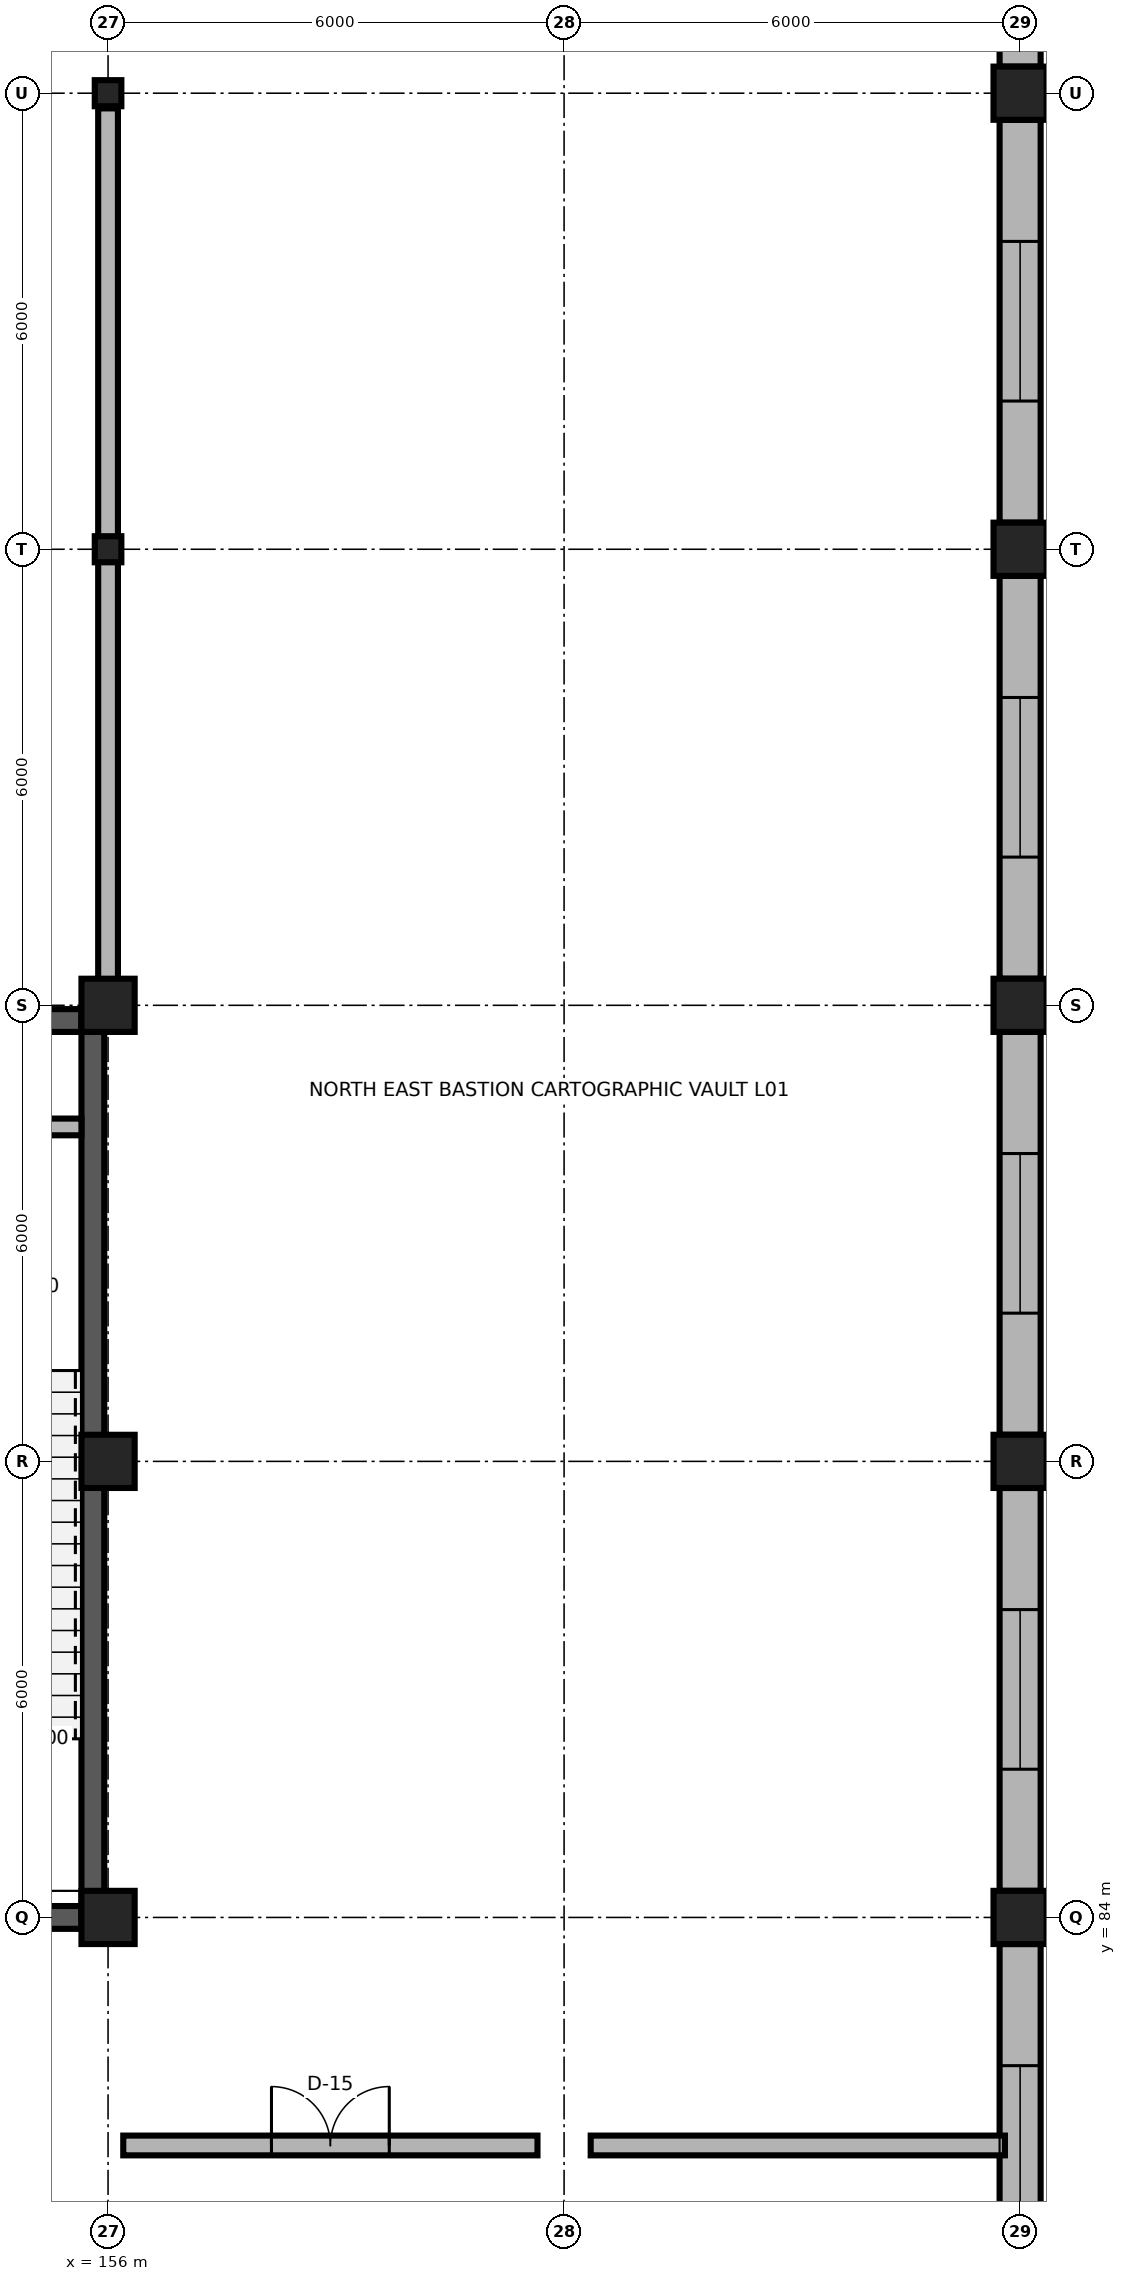
"""IFC4 building model, lengths in metres.
Left out: names, types, materials, properties, quantities, classifications, styles, units other than length and angle.
Written with IfcOpenShell. Run it as: python <this file> out.ifc"""

import sys

from ifc_helpers import new_model, si_unit, direction, frame, frame_2d, origin, origin_2d, place, context, subcontext, project, spatial, rectangle, i_section, extrude, element, fill, save


model = new_model("IFC4")
c1 = context("Model", 3, precision=1e-05, world=origin(), true_north=direction((0.0, 1.0)))
c2 = subcontext(c1, "Body", "Model", "MODEL_VIEW")
j1 = project(units=[si_unit("LENGTHUNIT", "METRE"), si_unit("PLANEANGLEUNIT", "RADIAN")], contexts=[c1])
p1 = place(None, origin())
s1 = spatial("IfcSite", under=j1, at=p1, CompositionType="ELEMENT")
p2 = place(p1, origin())
s2 = spatial("IfcBuilding", under=s1, at=p2, CompositionType="ELEMENT")
p3 = place(p2, origin())
s3 = spatial("IfcBuildingStorey", under=s2, at=p3, CompositionType="ELEMENT", Elevation=0.0)
for number, where, z_axis, x_axis in (
    (1, (156.0, 84.0, 0.0), (0.0, 0.0, 1.0), (1.0, 0.0, 0.0)),
    (2, (168.0, 84.0, 0.0), (0.0, 0.0, 1.0), (1.0, 0.0, 0.0)),
    (3, (156.0, 90.0, 0.0), (0.0, 0.0, 1.0), (1.0, 0.0, 0.0)),
    (4, (168.0, 90.0, 0.0), (0.0, 0.0, 1.0), (1.0, 0.0, 0.0)),
    (5, (156.0, 96.0, 0.0), (0.0, 0.0, 1.0), (1.0, 0.0, 0.0)),
    (6, (168.0, 96.0, 0.0), (0.0, 0.0, 1.0), (1.0, 0.0, 0.0)),
):
    element("IfcColumn", number, at=place(p3, frame(where, z_axis=z_axis, x_axis=x_axis)), inside=s3, PredefinedType="COLUMN", context=c2, shape_type="SweptSolid", body=[
        extrude(rectangle(XDim=0.7, YDim=0.7, at=origin_2d()), origin(), (0.0, 0.0, 1.0), 6.0),
    ])
p4 = place(p3, frame((156.0, 102.0, 0.0), z_axis=(0.0, 0.0, 1.0), x_axis=(1.0, 0.0, 0.0)))
e7 = element("IfcColumn", 7, at=p4, inside=s3, PredefinedType="COLUMN", context=c2, shape_type="SweptSolid", body=[
    extrude(i_section(OverallWidth=0.35, OverallDepth=0.343, WebThickness=0.01, FlangeThickness=0.015, FilletRadius=0.02, at=origin_2d()), origin(), (0.0, 0.0, 1.0), 6.0),
])
p5 = place(p3, frame((168.0, 102.0, 0.0), z_axis=(0.0, 0.0, 1.0), x_axis=(1.0, 0.0, 0.0)))
e8 = element("IfcColumn", 8, at=p5, inside=s3, PredefinedType="COLUMN", context=c2, shape_type="SweptSolid", body=[
    extrude(rectangle(XDim=0.7, YDim=0.7, at=origin_2d()), origin(), (0.0, 0.0, 1.0), 6.0),
])
p6 = place(p3, frame((156.0, 108.0, 0.0), z_axis=(0.0, 0.0, 1.0), x_axis=(1.0, 0.0, 0.0)))
e9 = element("IfcColumn", 9, at=p6, inside=s3, PredefinedType="COLUMN", context=c2, shape_type="SweptSolid", body=[
    extrude(i_section(OverallWidth=0.35, OverallDepth=0.343, WebThickness=0.01, FlangeThickness=0.015, FilletRadius=0.02, at=origin_2d()), origin(), (0.0, 0.0, 1.0), 6.0),
])
p7 = place(p3, frame((168.0, 108.0, 0.0), z_axis=(0.0, 0.0, 1.0), x_axis=(1.0, 0.0, 0.0)))
e10 = element("IfcColumn", 10, at=p7, inside=s3, PredefinedType="COLUMN", context=c2, shape_type="SweptSolid", body=[
    extrude(rectangle(XDim=0.7, YDim=0.7, at=origin_2d()), origin(), (0.0, 0.0, 1.0), 6.0),
])
p8 = place(p3, frame((168.0, 78.35, 0.0), z_axis=(0.0, 0.0, 1.0), x_axis=(0.0, 1.0, 0.0)))
e11 = element("IfcWall", 11, at=p8, inside=s3, PredefinedType="SOLIDWALL", context=c2, shape_type="SweptSolid", body=[
    extrude(rectangle(XDim=5.3, YDim=0.54, at=frame_2d((2.65, 0.0))), origin(), (0.0, 0.0, 1.0), 5.31),
])
p9 = place(p8, frame((1.6, 0.0, 0.85)))
e12 = element("IfcOpeningElement", 12, at=p9, cuts=e11, PredefinedType="OPENING", context=c2, shape_type="SweptSolid", body=[
    extrude(rectangle(XDim=2.1, YDim=3.4, at=frame_2d((1.05, 1.7))), frame((0.0, 0.285, 0.0), z_axis=(0.0, -1.0, 0.0), x_axis=(1.0, 0.0, 0.0)), (0.0, 0.0, 1.0), 0.57),
])
p10 = place(p3, frame((168.0, 84.35, 0.0), z_axis=(0.0, 0.0, 1.0), x_axis=(0.0, 1.0, 0.0)))
e13 = element("IfcWall", 13, at=p10, inside=s3, PredefinedType="SOLIDWALL", context=c2, shape_type="SweptSolid", body=[
    extrude(rectangle(XDim=5.3, YDim=0.54, at=frame_2d((2.65, 0.0))), origin(), (0.0, 0.0, 1.0), 5.31),
])
p11 = place(p10, frame((1.6, 0.0, 0.85)))
e14 = element("IfcOpeningElement", 14, at=p11, cuts=e13, PredefinedType="OPENING", context=c2, shape_type="SweptSolid", body=[
    extrude(rectangle(XDim=2.1, YDim=3.4, at=frame_2d((1.05, 1.7))), frame((0.0, 0.285, 0.0), z_axis=(0.0, -1.0, 0.0), x_axis=(1.0, 0.0, 0.0)), (0.0, 0.0, 1.0), 0.57),
])
p12 = place(p3, frame((168.0, 90.35, 0.0), z_axis=(0.0, 0.0, 1.0), x_axis=(0.0, 1.0, 0.0)))
e15 = element("IfcWall", 15, at=p12, inside=s3, PredefinedType="SOLIDWALL", context=c2, shape_type="SweptSolid", body=[
    extrude(rectangle(XDim=5.3, YDim=0.54, at=frame_2d((2.65, 0.0))), origin(), (0.0, 0.0, 1.0), 5.31),
])
p13 = place(p12, frame((1.6, 0.0, 0.85)))
e16 = element("IfcOpeningElement", 16, at=p13, cuts=e15, PredefinedType="OPENING", context=c2, shape_type="SweptSolid", body=[
    extrude(rectangle(XDim=2.1, YDim=3.4, at=frame_2d((1.05, 1.7))), frame((0.0, 0.285, 0.0), z_axis=(0.0, -1.0, 0.0), x_axis=(1.0, 0.0, 0.0)), (0.0, 0.0, 1.0), 0.57),
])
p14 = place(p3, frame((168.0, 96.35, 0.0), z_axis=(0.0, 0.0, 1.0), x_axis=(0.0, 1.0, 0.0)))
e17 = element("IfcWall", 17, at=p14, inside=s3, PredefinedType="SOLIDWALL", context=c2, shape_type="SweptSolid", body=[
    extrude(rectangle(XDim=5.3, YDim=0.54, at=frame_2d((2.65, 0.0))), origin(), (0.0, 0.0, 1.0), 5.31),
])
p15 = place(p14, frame((1.6, 0.0, 0.85)))
e18 = element("IfcOpeningElement", 18, at=p15, cuts=e17, PredefinedType="OPENING", context=c2, shape_type="SweptSolid", body=[
    extrude(rectangle(XDim=2.1, YDim=3.4, at=frame_2d((1.05, 1.7))), frame((0.0, 0.285, 0.0), z_axis=(0.0, -1.0, 0.0), x_axis=(1.0, 0.0, 0.0)), (0.0, 0.0, 1.0), 0.57),
])
p16 = place(p3, frame((168.0, 102.35, 0.0), z_axis=(0.0, 0.0, 1.0), x_axis=(0.0, 1.0, 0.0)))
e19 = element("IfcWall", 19, at=p16, inside=s3, PredefinedType="SOLIDWALL", context=c2, shape_type="SweptSolid", body=[
    extrude(rectangle(XDim=5.3, YDim=0.54, at=frame_2d((2.65, 0.0))), origin(), (0.0, 0.0, 1.0), 5.31),
])
p17 = place(p16, frame((1.6, 0.0, 0.85)))
e20 = element("IfcOpeningElement", 20, at=p17, cuts=e19, PredefinedType="OPENING", context=c2, shape_type="SweptSolid", body=[
    extrude(rectangle(XDim=2.1, YDim=3.4, at=frame_2d((1.05, 1.7))), frame((0.0, 0.285, 0.0), z_axis=(0.0, -1.0, 0.0), x_axis=(1.0, 0.0, 0.0)), (0.0, 0.0, 1.0), 0.57),
])
p18 = place(p3, frame((168.0, 108.35, 0.0), z_axis=(0.0, 0.0, 1.0), x_axis=(0.0, 1.0, 0.0)))
e21 = element("IfcWall", 21, at=p18, inside=s3, PredefinedType="SOLIDWALL", context=c2, shape_type="SweptSolid", body=[
    extrude(rectangle(XDim=5.3, YDim=0.54, at=frame_2d((2.65, 0.0))), origin(), (0.0, 0.0, 1.0), 5.31),
])
p19 = place(p18, frame((1.9, 0.0, 0.85)))
e22 = element("IfcOpeningElement", 22, at=p19, cuts=e21, PredefinedType="OPENING", context=c2, shape_type="SweptSolid", body=[
    extrude(rectangle(XDim=1.5, YDim=2.8, at=frame_2d((0.75, 1.4))), frame((0.0, 0.285, 0.0), z_axis=(0.0, -1.0, 0.0), x_axis=(1.0, 0.0, 0.0)), (0.0, 0.0, 1.0), 0.57),
])
p20 = place(p3, frame((150.35, 84.0, 0.0), z_axis=(0.0, 0.0, 1.0), x_axis=(1.0, 0.0, 0.0)))
e23 = element("IfcWall", 23, at=p20, inside=s3, PredefinedType="SHEAR", context=c2, shape_type="SweptSolid", body=[
    extrude(rectangle(XDim=5.3, YDim=0.3, at=frame_2d((2.65, 0.0))), origin(), (0.0, 0.0, 1.0), 5.76),
])
p21 = place(p20, frame((1.925, 0.0, 0.0)))
e24 = element("IfcOpeningElement", 24, at=p21, cuts=e23, PredefinedType="OPENING", context=c2, shape_type="SweptSolid", body=[
    extrude(rectangle(XDim=1.45, YDim=2.25, at=frame_2d((0.725, 1.125))), frame((0.0, 0.165, 0.0), z_axis=(0.0, -1.0, 0.0), x_axis=(1.0, 0.0, 0.0)), (0.0, 0.0, 1.0), 0.33),
])
p22 = place(p3, frame((150.35, 95.8, 0.0), z_axis=(0.0, 0.0, 1.0), x_axis=(1.0, 0.0, 0.0)))
e25 = element("IfcWall", 25, at=p22, inside=s3, PredefinedType="SHEAR", context=c2, shape_type="SweptSolid", body=[
    extrude(rectangle(XDim=5.3, YDim=0.3, at=frame_2d((2.65, 0.0))), origin(), (0.0, 0.0, 1.0), 5.76),
])
p23 = place(p3, frame((155.8, 84.0, 0.0), z_axis=(0.0, 0.0, 1.0), x_axis=(0.0, 1.0, 0.0)))
e26 = element("IfcWall", 26, at=p23, inside=s3, PredefinedType="SHEAR", context=c2, shape_type="SweptSolid", body=[
    extrude(rectangle(XDim=11.8, YDim=0.3, at=frame_2d((5.9, 0.0))), origin(), (0.0, 0.0, 1.0), 5.76),
])
p24 = place(p3, frame((154.55, 94.4, 0.0), z_axis=(0.0, 0.0, 1.0), x_axis=(1.0, 0.0, 0.0)))
e27 = element("IfcWall", 27, at=p24, inside=s3, PredefinedType="PARTITIONING", context=c2, shape_type="SweptSolid", body=[
    extrude(rectangle(XDim=1.1, YDim=0.22, at=frame_2d((0.55, 0.0))), origin(), (0.0, 0.0, 1.0), 5.76),
])
p25 = place(p3, frame((156.2, 81.0, 0.0), z_axis=(0.0, 0.0, 1.0), x_axis=(1.0, 0.0, 0.0)))
e28 = element("IfcWall", 28, at=p25, inside=s3, PredefinedType="PARTITIONING", context=c2, shape_type="SweptSolid", body=[
    extrude(rectangle(XDim=5.45, YDim=0.26, at=frame_2d((2.725, 0.0))), origin(), (0.0, 0.0, 1.0), 5.76),
])
p26 = place(p25, frame((1.95, 0.0, 0.0)))
e29 = element("IfcOpeningElement", 29, at=p26, cuts=e28, PredefinedType="OPENING", context=c2, shape_type="SweptSolid", body=[
    extrude(rectangle(XDim=1.55, YDim=2.3, at=frame_2d((0.775, 1.15))), frame((0.0, 0.145, 0.0), z_axis=(0.0, -1.0, 0.0), x_axis=(1.0, 0.0, 0.0)), (0.0, 0.0, 1.0), 0.29),
])
p27 = place(p3, frame((162.35, 81.0, 0.0), z_axis=(0.0, 0.0, 1.0), x_axis=(1.0, 0.0, 0.0)))
e30 = element("IfcWall", 30, at=p27, inside=s3, PredefinedType="PARTITIONING", context=c2, shape_type="SweptSolid", body=[
    extrude(rectangle(XDim=5.45, YDim=0.26, at=frame_2d((2.725, 0.0))), origin(), (0.0, 0.0, 1.0), 5.76),
])
p28 = place(p3, frame((156.0, 96.2, 0.0), z_axis=(0.0, 0.0, 1.0), x_axis=(0.0, 1.0, 0.0)))
e31 = element("IfcWall", 31, at=p28, inside=s3, PredefinedType="PARTITIONING", context=c2, shape_type="SweptSolid", body=[
    extrude(rectangle(XDim=11.6, YDim=0.26, at=frame_2d((5.8, 0.0))), origin(), (0.0, 0.0, 1.0), 5.32),
])
p29 = place(p9, origin())
e32 = element("IfcWindow", 32, at=p29, inside=s3, PartitioningType="SINGLE_PANEL", PredefinedType="WINDOW", context=c2, shape_type="SweptSolid", body=[
    extrude(rectangle(XDim=2.1, YDim=3.4, at=frame_2d((1.05, 1.7))), frame((0.0, 0.03, 0.0), z_axis=(0.0, -1.0, 0.0), x_axis=(1.0, 0.0, 0.0)), (0.0, 0.0, 1.0), 0.06),
])
fill(e12, e32)
p30 = place(p11, origin())
e33 = element("IfcWindow", 33, at=p30, inside=s3, PartitioningType="SINGLE_PANEL", PredefinedType="WINDOW", context=c2, shape_type="SweptSolid", body=[
    extrude(rectangle(XDim=2.1, YDim=3.4, at=frame_2d((1.05, 1.7))), frame((0.0, 0.03, 0.0), z_axis=(0.0, -1.0, 0.0), x_axis=(1.0, 0.0, 0.0)), (0.0, 0.0, 1.0), 0.06),
])
fill(e14, e33)
p31 = place(p13, origin())
e34 = element("IfcWindow", 34, at=p31, inside=s3, PartitioningType="SINGLE_PANEL", PredefinedType="WINDOW", context=c2, shape_type="SweptSolid", body=[
    extrude(rectangle(XDim=2.1, YDim=3.4, at=frame_2d((1.05, 1.7))), frame((0.0, 0.03, 0.0), z_axis=(0.0, -1.0, 0.0), x_axis=(1.0, 0.0, 0.0)), (0.0, 0.0, 1.0), 0.06),
])
fill(e16, e34)
p32 = place(p15, origin())
e35 = element("IfcWindow", 35, at=p32, inside=s3, PartitioningType="SINGLE_PANEL", PredefinedType="WINDOW", context=c2, shape_type="SweptSolid", body=[
    extrude(rectangle(XDim=2.1, YDim=3.4, at=frame_2d((1.05, 1.7))), frame((0.0, 0.03, 0.0), z_axis=(0.0, -1.0, 0.0), x_axis=(1.0, 0.0, 0.0)), (0.0, 0.0, 1.0), 0.06),
])
fill(e18, e35)
p33 = place(p17, origin())
e36 = element("IfcWindow", 36, at=p33, inside=s3, PartitioningType="SINGLE_PANEL", PredefinedType="WINDOW", context=c2, shape_type="SweptSolid", body=[
    extrude(rectangle(XDim=2.1, YDim=3.4, at=frame_2d((1.05, 1.7))), frame((0.0, 0.03, 0.0), z_axis=(0.0, -1.0, 0.0), x_axis=(1.0, 0.0, 0.0)), (0.0, 0.0, 1.0), 0.06),
])
fill(e20, e36)
p34 = place(p26, origin())
e37 = element("IfcDoor", 37, at=p34, inside=s3, OperationType="DOUBLE_DOOR_SINGLE_SWING", PredefinedType="DOOR", context=c2, shape_type="SweptSolid", body=[
    extrude(rectangle(XDim=1.55, YDim=2.3, at=frame_2d((0.775, 1.15))), frame((0.0, 0.025, 0.0), z_axis=(0.0, -1.0, 0.0), x_axis=(1.0, 0.0, 0.0)), (0.0, 0.0, 1.0), 0.05),
])
fill(e29, e37)
save(model, sys.argv[1])
